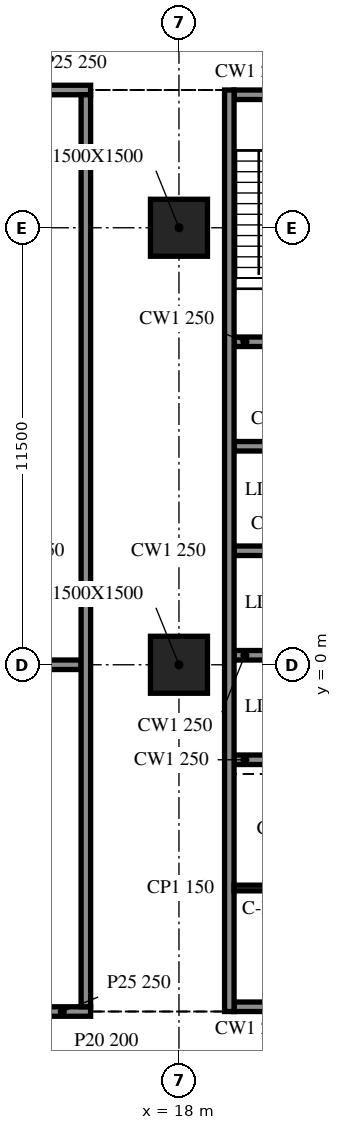
"""IFC4 building model, lengths in metres.
Left out: names, types, materials, properties, quantities, classifications, styles, units other than length and angle.
Written with IfcOpenShell. Run it as: python <this file> out.ifc"""

import sys

from ifc_helpers import new_model, si_unit, direction, frame, frame_2d, origin, origin_2d, place, context, subcontext, project, spatial, rectangle, extrude, element, save


model = new_model("IFC4")
c1 = context("Model", 3, precision=1e-05, world=origin(), true_north=direction((0.0, 1.0)))
c2 = subcontext(c1, "Body", "Model", "MODEL_VIEW")
j1 = project(units=[si_unit("LENGTHUNIT", "METRE"), si_unit("PLANEANGLEUNIT", "RADIAN")], contexts=[c1])
p1 = place(None, origin())
s1 = spatial("IfcSite", under=j1, at=p1, CompositionType="ELEMENT")
p2 = place(p1, origin())
s2 = spatial("IfcBuilding", under=s1, at=p2, CompositionType="ELEMENT")
p3 = place(p2, frame((0.0, 0.0, 63.2)))
s3 = spatial("IfcBuildingStorey", under=s2, at=p3, CompositionType="ELEMENT", Elevation=63.2)
for number, where, z_axis, x_axis in (
    (1, (18.0, 0.0, -0.34), (0.0, 0.0, 1.0), (1.0, 0.0, 0.0)),
    (2, (18.0, 11.5, -0.34), (0.0, 0.0, 1.0), (1.0, 0.0, 0.0)),
):
    element("IfcColumn", number, at=place(p3, frame(where, z_axis=z_axis, x_axis=x_axis)), inside=s3, PredefinedType="COLUMN", context=c2, shape_type="SweptSolid", body=[
        extrude(rectangle(XDim=1.5, YDim=1.5, at=origin_2d()), origin(), (0.0, 0.0, 1.0), 4.3),
    ])
p4 = place(p3, frame((19.325, 15.125, 0.0), z_axis=(0.0, 0.0, 1.0), x_axis=(0.0, -1.0, 0.0)))
e3 = element("IfcWall", 3, at=p4, inside=s3, PredefinedType="SOLIDWALL", context=c2, shape_type="SweptSolid", body=[
    extrude(rectangle(XDim=24.25, YDim=0.25, at=frame_2d((12.125, 0.0))), origin(), (0.0, 0.0, 1.0), 3.96),
])
p5 = place(p3, frame((28.55, -9.0, 0.0), z_axis=(0.0, 0.0, 1.0), x_axis=(-1.0, 0.0, 0.0)))
e4 = element("IfcWall", 4, at=p5, inside=s3, PredefinedType="SOLIDWALL", context=c2, shape_type="SweptSolid", body=[
    extrude(rectangle(XDim=9.1, YDim=0.25, at=frame_2d((4.55, 0.0))), origin(), (0.0, 0.0, 1.0), 3.96),
])
p6 = place(p5, frame((3.65, 0.0, 0.0)))
e5 = element("IfcOpeningElement", 5, at=p6, cuts=e4, PredefinedType="OPENING", context=c2, shape_type="SweptSolid", body=[
    extrude(rectangle(XDim=1.8, YDim=2.1, at=frame_2d((0.9, 1.05))), frame((0.0, 0.135, 0.0), z_axis=(0.0, -1.0, 0.0), x_axis=(1.0, 0.0, 0.0)), (0.0, 0.0, 1.0), 0.27),
])
p7 = place(p3, frame((19.45, 15.0, 0.0), z_axis=(0.0, 0.0, 1.0), x_axis=(1.0, 0.0, 0.0)))
e6 = element("IfcWall", 6, at=p7, inside=s3, PredefinedType="SOLIDWALL", context=c2, shape_type="SweptSolid", body=[
    extrude(rectangle(XDim=9.1, YDim=0.25, at=frame_2d((4.55, 0.0))), origin(), (0.0, 0.0, 1.0), 3.96),
])
p8 = place(p7, frame((3.65, 0.0, 0.0)))
e7 = element("IfcOpeningElement", 7, at=p8, cuts=e6, PredefinedType="OPENING", context=c2, shape_type="SweptSolid", body=[
    extrude(rectangle(XDim=1.8, YDim=2.1, at=frame_2d((0.9, 1.05))), frame((0.0, 0.135, 0.0), z_axis=(0.0, -1.0, 0.0), x_axis=(1.0, 0.0, 0.0)), (0.0, 0.0, 1.0), 0.27),
])
for number, where, z_axis, x_axis in (
    (8, (19.45, -2.5, 0.0), (0.0, 0.0, 1.0), (1.0, 0.0, 0.0)),
    (9, (19.45, 0.25, 0.0), (0.0, 0.0, 1.0), (1.0, 0.0, 0.0)),
    (10, (19.45, 3.0, 0.0), (0.0, 0.0, 1.0), (1.0, 0.0, 0.0)),
    (11, (19.45, 5.75, 0.0), (0.0, 0.0, 1.0), (1.0, 0.0, 0.0)),
    (12, (19.45, 8.5, 0.0), (0.0, 0.0, 1.0), (1.0, 0.0, 0.0)),
):
    element("IfcWall", number, at=place(p3, frame(where, z_axis=z_axis, x_axis=x_axis)), inside=s3, PredefinedType="SOLIDWALL", context=c2, shape_type="SweptSolid", body=[
        extrude(rectangle(XDim=2.85, YDim=0.25, at=frame_2d((1.425, 0.0))), origin(), (0.0, 0.0, 1.0), 3.96),
    ])
p9 = place(p3, frame((19.45, -5.875, 0.0), z_axis=(0.0, 0.0, 1.0), x_axis=(1.0, 0.0, 0.0)))
e13 = element("IfcWall", 13, at=p9, inside=s3, PredefinedType="PARTITIONING", context=c2, shape_type="SweptSolid", body=[
    extrude(rectangle(XDim=2.85, YDim=0.15, at=frame_2d((1.425, 0.0))), origin(), (0.0, 0.0, 1.0), 3.96),
])
p10 = place(p3, frame((8.225, -9.125, 0.0), z_axis=(0.0, 0.0, 1.0), x_axis=(1.0, 0.0, 0.0)))
e14 = element("IfcWall", 14, at=p10, inside=s3, PredefinedType="PARTITIONING", context=c2, shape_type="SweptSolid", body=[
    extrude(rectangle(XDim=7.45, YDim=0.25, at=frame_2d((3.725, 0.0))), origin(), (0.0, 0.0, 1.0), 3.96),
])
p11 = place(p10, frame((3.3, 0.0, 0.0)))
e15 = element("IfcOpeningElement", 15, at=p11, cuts=e14, PredefinedType="OPENING", context=c2, shape_type="SweptSolid", body=[
    extrude(rectangle(XDim=0.9, YDim=2.1, at=frame_2d((0.45, 1.05))), frame((0.0, 0.135, 0.0), z_axis=(0.0, -1.0, 0.0), x_axis=(1.0, 0.0, 0.0)), (0.0, 0.0, 1.0), 0.27),
])
p12 = place(p3, frame((8.475, 0.0, 0.0), z_axis=(0.0, 0.0, 1.0), x_axis=(1.0, 0.0, 0.0)))
e16 = element("IfcWall", 16, at=p12, inside=s3, PredefinedType="PARTITIONING", context=c2, shape_type="SweptSolid", body=[
    extrude(rectangle(XDim=6.95, YDim=0.25, at=frame_2d((3.475, 0.0))), origin(), (0.0, 0.0, 1.0), 3.96),
])
p13 = place(p3, frame((8.225, 15.125, 0.0), z_axis=(0.0, 0.0, 1.0), x_axis=(1.0, 0.0, 0.0)))
e17 = element("IfcWall", 17, at=p13, inside=s3, PredefinedType="PARTITIONING", context=c2, shape_type="SweptSolid", body=[
    extrude(rectangle(XDim=7.45, YDim=0.25, at=frame_2d((3.725, 0.0))), origin(), (0.0, 0.0, 1.0), 3.96),
])
p14 = place(p13, frame((3.3, 0.0, 0.0)))
e18 = element("IfcOpeningElement", 18, at=p14, cuts=e17, PredefinedType="OPENING", context=c2, shape_type="SweptSolid", body=[
    extrude(rectangle(XDim=0.9, YDim=2.1, at=frame_2d((0.45, 1.05))), frame((0.0, 0.135, 0.0), z_axis=(0.0, -1.0, 0.0), x_axis=(1.0, 0.0, 0.0)), (0.0, 0.0, 1.0), 0.27),
])
p15 = place(p3, frame((15.55, -9.0, 0.0), z_axis=(0.0, 0.0, 1.0), x_axis=(0.0, 1.0, 0.0)))
e19 = element("IfcWall", 19, at=p15, inside=s3, PredefinedType="PARTITIONING", context=c2, shape_type="SweptSolid", body=[
    extrude(rectangle(XDim=24.0, YDim=0.25, at=frame_2d((12.0, 0.0))), origin(), (0.0, 0.0, 1.0), 3.96),
])
save(model, sys.argv[1])
